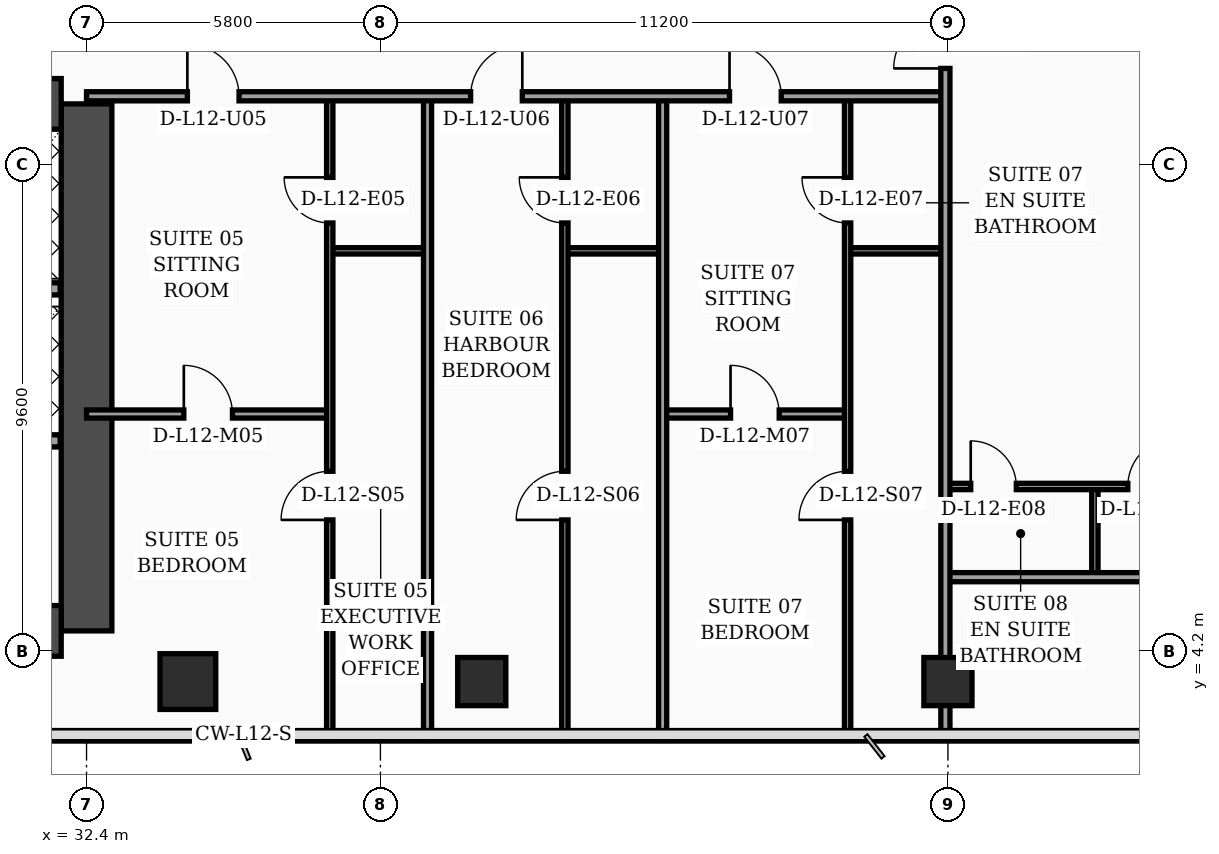
"""IFC4 building model, lengths in metres.
Left out: names, types, materials, properties, quantities, classifications, styles, units other than length and angle.
Written with IfcOpenShell. Run it as: python <this file> out.ifc"""

import sys

from ifc_helpers import new_model, si_unit, direction, frame, frame_2d, origin, origin_2d, place, context, subcontext, project, spatial, rectangle, hollow_rectangle, extrude, element, fill, save


model = new_model("IFC4")
c1 = context("Model", 3, precision=1e-05, world=origin(), true_north=direction((0.0, 1.0)))
c2 = subcontext(c1, "Body", "Model", "MODEL_VIEW")
j1 = project(units=[si_unit("LENGTHUNIT", "METRE"), si_unit("PLANEANGLEUNIT", "RADIAN")], contexts=[c1])
p1 = place(None, origin())
s1 = spatial("IfcSite", under=j1, at=p1, CompositionType="ELEMENT")
p2 = place(p1, origin())
s2 = spatial("IfcBuilding", under=s1, at=p2, CompositionType="ELEMENT")
p3 = place(p2, frame((0.0, 0.0, 54.6)))
s3 = spatial("IfcBuildingStorey", under=s2, at=p3, CompositionType="ELEMENT", Elevation=54.6)
p4 = place(p3, frame((32.4, 4.6, 0.0), z_axis=(0.0, 0.0, 1.0), x_axis=(0.0, 1.0, 0.0)))
e1 = element("IfcWall", 1, at=p4, inside=s3, PredefinedType="SHEAR", context=c2, shape_type="SweptSolid", body=[
    extrude(rectangle(XDim=10.4, YDim=1.0, at=frame_2d((5.2, 0.0))), origin(), (0.0, 0.0, 1.0), 3.56),
])
p5 = place(p3, frame((22.1, 15.0, 0.0), z_axis=(0.0, 0.0, 1.0), x_axis=(1.0, 0.0, 0.0)))
e2 = element("IfcWall", 2, at=p5, inside=s3, PredefinedType="SHEAR", context=c2, shape_type="SweptSolid", body=[
    extrude(rectangle(XDim=9.8, YDim=1.0, at=frame_2d((4.9, 0.0))), origin(), (0.0, 0.0, 1.0), 3.56),
])
p6 = place(p5, frame((4.8, 0.0, 0.0)))
e3 = element("IfcOpeningElement", 3, at=p6, cuts=e2, PredefinedType="OPENING", context=c2, shape_type="SweptSolid", body=[
    extrude(rectangle(XDim=1.1, YDim=2.2, at=frame_2d((0.55, 1.1))), frame((0.0, 0.51, 0.0), z_axis=(0.0, -1.0, 0.0), x_axis=(1.0, 0.0, 0.0)), (0.0, 0.0, 1.0), 1.02),
])
p7 = place(p3, frame((22.1, 4.6, 0.0), z_axis=(0.0, 0.0, 1.0), x_axis=(1.0, 0.0, 0.0)))
e4 = element("IfcWall", 4, at=p7, inside=s3, PredefinedType="SHEAR", context=c2, shape_type="SweptSolid", body=[
    extrude(rectangle(XDim=9.8, YDim=1.0, at=frame_2d((4.9, 0.0))), origin(), (0.0, 0.0, 1.0), 3.56),
])
p8 = place(p3, frame((34.4, 3.6, 0.0), z_axis=(0.0, 0.0, 1.0), x_axis=(1.0, 0.0, 0.0)))
e5 = element("IfcColumn", 5, at=p8, inside=s3, PredefinedType="COLUMN", context=c2, shape_type="SweptSolid", body=[
    extrude(hollow_rectangle(XDim=1.1, YDim=1.1, WallThickness=0.045, at=origin_2d()), origin(), (0.0, 0.0, 1.0), 3.56),
])
for number, where, z_axis, x_axis in (
    (6, (40.2, 3.6, 0.0), (0.0, 0.0, 1.0), (1.0, 0.0, 0.0)),
    (7, (49.4, 3.6, 0.0), (0.0, 0.0, 1.0), (1.0, 0.0, 0.0)),
):
    element("IfcColumn", number, at=place(p3, frame(where, z_axis=z_axis, x_axis=x_axis)), inside=s3, PredefinedType="COLUMN", context=c2, shape_type="SweptSolid", body=[
        extrude(hollow_rectangle(XDim=0.95, YDim=0.95, WallThickness=0.04, at=origin_2d()), origin(), (0.0, 0.0, 1.0), 3.56),
    ])
p9 = place(p3, frame((27.02, 11.35, 0.0), z_axis=(0.0, 0.0, 1.0), x_axis=(1.0, 0.0, 0.0)))
e8 = element("IfcWall", 8, at=p9, inside=s3, PredefinedType="SOLIDWALL", context=c2, shape_type="SweptSolid", body=[
    extrude(rectangle(XDim=4.86, YDim=0.24, at=frame_2d((2.43, 0.0))), origin(), (0.0, 0.0, 1.0), 3.56),
])
p10 = place(p9, frame((0.45, 0.0, 0.0)))
e9 = element("IfcOpeningElement", 9, at=p10, cuts=e8, PredefinedType="OPENING", context=c2, shape_type="SweptSolid", body=[
    extrude(rectangle(XDim=1.3, YDim=2.35, at=frame_2d((0.65, 1.175))), frame((0.0, 0.13, 0.0), z_axis=(0.0, -1.0, 0.0), x_axis=(1.0, 0.0, 0.0)), (0.0, 0.0, 1.0), 0.26),
])
p11 = place(p3, frame((27.02, 8.35, 0.0), z_axis=(0.0, 0.0, 1.0), x_axis=(1.0, 0.0, 0.0)))
e10 = element("IfcWall", 10, at=p11, inside=s3, PredefinedType="SOLIDWALL", context=c2, shape_type="SweptSolid", body=[
    extrude(rectangle(XDim=4.86, YDim=0.24, at=frame_2d((2.43, 0.0))), origin(), (0.0, 0.0, 1.0), 3.56),
])
p12 = place(p3, frame((37.2, 12.1, 0.0), z_axis=(0.0, 0.0, 1.0), x_axis=(1.0, 0.0, 0.0)))
e11 = element("IfcWall", 11, at=p12, inside=s3, PredefinedType="PARTITIONING", context=c2, shape_type="SweptSolid", body=[
    extrude(rectangle(XDim=1.93, YDim=0.125, at=frame_2d((0.965, 0.0))), origin(), (0.0, 0.0, 1.0), 3.56),
])
p13 = place(p3, frame((32.4, 8.88, 0.0), z_axis=(0.0, 0.0, 1.0), x_axis=(1.0, 0.0, 0.0)))
e12 = element("IfcWall", 12, at=p13, inside=s3, PredefinedType="PARTITIONING", context=c2, shape_type="SweptSolid", body=[
    extrude(rectangle(XDim=4.8, YDim=0.16, at=frame_2d((2.4, 0.0))), origin(), (0.0, 0.0, 1.0), 2.84),
])
p14 = place(p13, frame((1.92, 0.0, 0.0)))
e13 = element("IfcOpeningElement", 13, at=p14, cuts=e12, PredefinedType="OPENING", context=c2, shape_type="SweptSolid", body=[
    extrude(rectangle(XDim=0.96, YDim=2.2, at=frame_2d((0.48, 1.1))), frame((0.0, 0.09, 0.0), z_axis=(0.0, -1.0, 0.0), x_axis=(1.0, 0.0, 0.0)), (0.0, 0.0, 1.0), 0.18),
])
p15 = place(p3, frame((37.2, 2.44, 0.0), z_axis=(0.0, 0.0, 1.0), x_axis=(0.0, 1.0, 0.0)))
e14 = element("IfcWall", 14, at=p15, inside=s3, PredefinedType="PARTITIONING", context=c2, shape_type="SweptSolid", body=[
    extrude(rectangle(XDim=12.71, YDim=0.125, at=frame_2d((6.355, 0.0))), origin(), (0.0, 0.0, 1.0), 2.84),
])
p16 = place(p15, frame((4.35, 0.0, 0.0)))
e15 = element("IfcOpeningElement", 15, at=p16, cuts=e14, PredefinedType="OPENING", context=c2, shape_type="SweptSolid", body=[
    extrude(rectangle(XDim=0.96, YDim=2.2, at=frame_2d((0.48, 1.1))), frame((0.0, 0.073, 0.0), z_axis=(0.0, -1.0, 0.0), x_axis=(1.0, 0.0, 0.0)), (0.0, 0.0, 1.0), 0.145),
])
p17 = place(p15, frame((10.21, 0.0, 0.0)))
e16 = element("IfcOpeningElement", 16, at=p17, cuts=e14, PredefinedType="OPENING", context=c2, shape_type="SweptSolid", body=[
    extrude(rectangle(XDim=0.9, YDim=2.15, at=frame_2d((0.45, 1.075))), frame((0.0, 0.073, 0.0), z_axis=(0.0, -1.0, 0.0), x_axis=(1.0, 0.0, 0.0)), (0.0, 0.0, 1.0), 0.145),
])
p18 = place(p3, frame((41.84, 12.1, 0.0), z_axis=(0.0, 0.0, 1.0), x_axis=(1.0, 0.0, 0.0)))
e17 = element("IfcWall", 17, at=p18, inside=s3, PredefinedType="PARTITIONING", context=c2, shape_type="SweptSolid", body=[
    extrude(rectangle(XDim=1.93, YDim=0.125, at=frame_2d((0.965, 0.0))), origin(), (0.0, 0.0, 1.0), 3.56),
])
p19 = place(p3, frame((41.84, 2.44, 0.0), z_axis=(0.0, 0.0, 1.0), x_axis=(0.0, 1.0, 0.0)))
e18 = element("IfcWall", 18, at=p19, inside=s3, PredefinedType="PARTITIONING", context=c2, shape_type="SweptSolid", body=[
    extrude(rectangle(XDim=12.71, YDim=0.125, at=frame_2d((6.355, 0.0))), origin(), (0.0, 0.0, 1.0), 3.04),
])
p20 = place(p19, frame((4.35, 0.0, 0.0)))
e19 = element("IfcOpeningElement", 19, at=p20, cuts=e18, PredefinedType="OPENING", context=c2, shape_type="SweptSolid", body=[
    extrude(rectangle(XDim=0.96, YDim=2.2, at=frame_2d((0.48, 1.1))), frame((0.0, 0.073, 0.0), z_axis=(0.0, -1.0, 0.0), x_axis=(1.0, 0.0, 0.0)), (0.0, 0.0, 1.0), 0.145),
])
p21 = place(p19, frame((10.21, 0.0, 0.0)))
e20 = element("IfcOpeningElement", 20, at=p21, cuts=e18, PredefinedType="OPENING", context=c2, shape_type="SweptSolid", body=[
    extrude(rectangle(XDim=0.9, YDim=2.15, at=frame_2d((0.45, 1.075))), frame((0.0, 0.073, 0.0), z_axis=(0.0, -1.0, 0.0), x_axis=(1.0, 0.0, 0.0)), (0.0, 0.0, 1.0), 0.145),
])
p22 = place(p3, frame((39.13, 2.44, 0.0), z_axis=(0.0, 0.0, 1.0), x_axis=(0.0, 1.0, 0.0)))
e21 = element("IfcWall", 21, at=p22, inside=s3, PredefinedType="PARTITIONING", context=c2, shape_type="SweptSolid", body=[
    extrude(rectangle(XDim=12.71, YDim=0.16, at=frame_2d((6.355, 0.0))), origin(), (0.0, 0.0, 1.0), 2.84),
])
p23 = place(p3, frame((47.42, 12.1, 0.0), z_axis=(0.0, 0.0, 1.0), x_axis=(1.0, 0.0, 0.0)))
e22 = element("IfcWall", 22, at=p23, inside=s3, PredefinedType="PARTITIONING", context=c2, shape_type="SweptSolid", body=[
    extrude(rectangle(XDim=1.93, YDim=0.125, at=frame_2d((0.965, 0.0))), origin(), (0.0, 0.0, 1.0), 2.84),
])
p24 = place(p3, frame((43.77, 8.88, 0.0), z_axis=(0.0, 0.0, 1.0), x_axis=(1.0, 0.0, 0.0)))
e23 = element("IfcWall", 23, at=p24, inside=s3, PredefinedType="PARTITIONING", context=c2, shape_type="SweptSolid", body=[
    extrude(rectangle(XDim=3.65, YDim=0.16, at=frame_2d((1.825, 0.0))), origin(), (0.0, 0.0, 1.0), 3.56),
])
p25 = place(p24, frame((1.34, 0.0, 0.0)))
e24 = element("IfcOpeningElement", 24, at=p25, cuts=e23, PredefinedType="OPENING", context=c2, shape_type="SweptSolid", body=[
    extrude(rectangle(XDim=0.96, YDim=2.2, at=frame_2d((0.48, 1.1))), frame((0.0, 0.09, 0.0), z_axis=(0.0, -1.0, 0.0), x_axis=(1.0, 0.0, 0.0)), (0.0, 0.0, 1.0), 0.18),
])
p26 = place(p3, frame((47.42, 2.44, 0.0), z_axis=(0.0, 0.0, 1.0), x_axis=(0.0, 1.0, 0.0)))
e25 = element("IfcWall", 25, at=p26, inside=s3, PredefinedType="PARTITIONING", context=c2, shape_type="SweptSolid", body=[
    extrude(rectangle(XDim=12.71, YDim=0.125, at=frame_2d((6.355, 0.0))), origin(), (0.0, 0.0, 1.0), 2.84),
])
p27 = place(p26, frame((4.35, 0.0, 0.0)))
e26 = element("IfcOpeningElement", 26, at=p27, cuts=e25, PredefinedType="OPENING", context=c2, shape_type="SweptSolid", body=[
    extrude(rectangle(XDim=0.96, YDim=2.2, at=frame_2d((0.48, 1.1))), frame((0.0, 0.073, 0.0), z_axis=(0.0, -1.0, 0.0), x_axis=(1.0, 0.0, 0.0)), (0.0, 0.0, 1.0), 0.145),
])
p28 = place(p26, frame((10.21, 0.0, 0.0)))
e27 = element("IfcOpeningElement", 27, at=p28, cuts=e25, PredefinedType="OPENING", context=c2, shape_type="SweptSolid", body=[
    extrude(rectangle(XDim=0.9, YDim=2.15, at=frame_2d((0.45, 1.075))), frame((0.0, 0.073, 0.0), z_axis=(0.0, -1.0, 0.0), x_axis=(1.0, 0.0, 0.0)), (0.0, 0.0, 1.0), 0.145),
])
p29 = place(p3, frame((43.77, 2.44, 0.0), z_axis=(0.0, 0.0, 1.0), x_axis=(0.0, 1.0, 0.0)))
e28 = element("IfcWall", 28, at=p29, inside=s3, PredefinedType="PARTITIONING", context=c2, shape_type="SweptSolid", body=[
    extrude(rectangle(XDim=12.71, YDim=0.16, at=frame_2d((6.355, 0.0))), origin(), (0.0, 0.0, 1.0), 3.04),
])
p30 = place(p3, frame((32.4, 15.15, 0.0), z_axis=(0.0, 0.0, 1.0), x_axis=(1.0, 0.0, 0.0)))
e29 = element("IfcWall", 29, at=p30, inside=s3, PredefinedType="PARTITIONING", context=c2, shape_type="SweptSolid", body=[
    extrude(rectangle(XDim=16.95, YDim=0.18, at=frame_2d((8.475, 0.0))), origin(), (0.0, 0.0, 1.0), 2.84),
])
p31 = place(p30, frame((1.99, 0.0, 0.0)))
e30 = element("IfcOpeningElement", 30, at=p31, cuts=e29, PredefinedType="OPENING", context=c2, shape_type="SweptSolid", body=[
    extrude(rectangle(XDim=1.02, YDim=2.2, at=frame_2d((0.51, 1.1))), frame((0.0, 0.1, 0.0), z_axis=(0.0, -1.0, 0.0), x_axis=(1.0, 0.0, 0.0)), (0.0, 0.0, 1.0), 0.2),
])
p32 = place(p30, frame((7.58, 0.0, 0.0)))
e31 = element("IfcOpeningElement", 31, at=p32, cuts=e29, PredefinedType="OPENING", context=c2, shape_type="SweptSolid", body=[
    extrude(rectangle(XDim=1.02, YDim=2.2, at=frame_2d((0.51, 1.1))), frame((0.0, 0.1, 0.0), z_axis=(0.0, -1.0, 0.0), x_axis=(1.0, 0.0, 0.0)), (0.0, 0.0, 1.0), 0.2),
])
p33 = place(p30, frame((12.69, 0.0, 0.0)))
e32 = element("IfcOpeningElement", 32, at=p33, cuts=e29, PredefinedType="OPENING", context=c2, shape_type="SweptSolid", body=[
    extrude(rectangle(XDim=1.02, YDim=2.2, at=frame_2d((0.51, 1.1))), frame((0.0, 0.1, 0.0), z_axis=(0.0, -1.0, 0.0), x_axis=(1.0, 0.0, 0.0)), (0.0, 0.0, 1.0), 0.2),
])
p34 = place(p3, frame((52.3, 5.66, 0.0), z_axis=(0.0, 0.0, 1.0), x_axis=(0.0, 1.0, 0.0)))
e33 = element("IfcWall", 33, at=p34, inside=s3, PredefinedType="PARTITIONING", context=c2, shape_type="SweptSolid", body=[
    extrude(rectangle(XDim=1.79, YDim=0.125, at=frame_2d((0.895, 0.0))), origin(), (0.0, 0.0, 1.0), 3.56),
])
p35 = place(p3, frame((49.35, 7.45, 0.0), z_axis=(0.0, 0.0, 1.0), x_axis=(1.0, 0.0, 0.0)))
e34 = element("IfcWall", 34, at=p35, inside=s3, PredefinedType="PARTITIONING", context=c2, shape_type="SweptSolid", body=[
    extrude(rectangle(XDim=13.61, YDim=0.125, at=frame_2d((6.805, 0.0))), origin(), (0.0, 0.0, 1.0), 3.04),
])
p36 = place(p35, frame((0.5, 0.0, 0.0)))
e35 = element("IfcOpeningElement", 35, at=p36, cuts=e34, PredefinedType="OPENING", context=c2, shape_type="SweptSolid", body=[
    extrude(rectangle(XDim=0.9, YDim=2.15, at=frame_2d((0.45, 1.075))), frame((0.0, 0.073, 0.0), z_axis=(0.0, -1.0, 0.0), x_axis=(1.0, 0.0, 0.0)), (0.0, 0.0, 1.0), 0.145),
])
p37 = place(p35, frame((3.6, 0.0, 0.0)))
e36 = element("IfcOpeningElement", 36, at=p37, cuts=e34, PredefinedType="OPENING", context=c2, shape_type="SweptSolid", body=[
    extrude(rectangle(XDim=0.96, YDim=2.2, at=frame_2d((0.48, 1.1))), frame((0.0, 0.073, 0.0), z_axis=(0.0, -1.0, 0.0), x_axis=(1.0, 0.0, 0.0)), (0.0, 0.0, 1.0), 0.145),
])
p38 = place(p3, frame((49.35, 5.66, 0.0), z_axis=(0.0, 0.0, 1.0), x_axis=(1.0, 0.0, 0.0)))
e37 = element("IfcWall", 37, at=p38, inside=s3, PredefinedType="PARTITIONING", context=c2, shape_type="SweptSolid", body=[
    extrude(rectangle(XDim=11.05, YDim=0.18, at=frame_2d((5.525, 0.0))), origin(), (0.0, 0.0, 1.0), 2.84),
])
p39 = place(p3, frame((49.35, 2.44, 0.0), z_axis=(0.0, 0.0, 1.0), x_axis=(0.0, 1.0, 0.0)))
e38 = element("IfcWall", 38, at=p39, inside=s3, PredefinedType="PARTITIONING", context=c2, shape_type="SweptSolid", body=[
    extrude(rectangle(XDim=27.84, YDim=0.18, at=frame_2d((13.92, 0.0))), origin(), (0.0, 0.0, 1.0), 2.84),
])
p40 = place(p39, frame((13.26, 0.0, 0.0)))
e39 = element("IfcOpeningElement", 39, at=p40, cuts=e38, PredefinedType="OPENING", context=c2, shape_type="SweptSolid", body=[
    extrude(rectangle(XDim=1.02, YDim=2.2, at=frame_2d((0.51, 1.1))), frame((0.0, 0.1, 0.0), z_axis=(0.0, -1.0, 0.0), x_axis=(1.0, 0.0, 0.0)), (0.0, 0.0, 1.0), 0.2),
])
p41 = place(p39, frame((21.52, 0.0, 0.0)))
e40 = element("IfcOpeningElement", 40, at=p41, cuts=e38, PredefinedType="OPENING", context=c2, shape_type="SweptSolid", body=[
    extrude(rectangle(XDim=1.02, YDim=2.2, at=frame_2d((0.51, 1.1))), frame((0.0, 0.1, 0.0), z_axis=(0.0, -1.0, 0.0), x_axis=(1.0, 0.0, 0.0)), (0.0, 0.0, 1.0), 0.2),
])
p42 = place(p14, origin())
e41 = element("IfcDoor", 41, at=p42, inside=s3, OperationType="SINGLE_SWING_LEFT", PredefinedType="DOOR", context=c2, shape_type="SweptSolid", body=[
    extrude(rectangle(XDim=0.96, YDim=2.2, at=frame_2d((0.48, 1.1))), frame((0.0, 0.025, 0.0), z_axis=(0.0, -1.0, 0.0), x_axis=(1.0, 0.0, 0.0)), (0.0, 0.0, 1.0), 0.05),
])
fill(e13, e41)
p43 = place(p16, origin())
e42 = element("IfcDoor", 42, at=p43, inside=s3, OperationType="SINGLE_SWING_LEFT", PredefinedType="DOOR", context=c2, shape_type="SweptSolid", body=[
    extrude(rectangle(XDim=0.96, YDim=2.2, at=frame_2d((0.48, 1.1))), frame((0.0, 0.025, 0.0), z_axis=(0.0, -1.0, 0.0), x_axis=(1.0, 0.0, 0.0)), (0.0, 0.0, 1.0), 0.05),
])
fill(e15, e42)
p44 = place(p17, origin())
e43 = element("IfcDoor", 43, at=p44, inside=s3, OperationType="SINGLE_SWING_RIGHT", PredefinedType="DOOR", context=c2, shape_type="SweptSolid", body=[
    extrude(rectangle(XDim=0.9, YDim=2.15, at=frame_2d((0.45, 1.075))), frame((0.0, 0.025, 0.0), z_axis=(0.0, -1.0, 0.0), x_axis=(1.0, 0.0, 0.0)), (0.0, 0.0, 1.0), 0.05),
])
fill(e16, e43)
p45 = place(p20, origin())
e44 = element("IfcDoor", 44, at=p45, inside=s3, OperationType="SINGLE_SWING_LEFT", PredefinedType="DOOR", context=c2, shape_type="SweptSolid", body=[
    extrude(rectangle(XDim=0.96, YDim=2.2, at=frame_2d((0.48, 1.1))), frame((0.0, 0.025, 0.0), z_axis=(0.0, -1.0, 0.0), x_axis=(1.0, 0.0, 0.0)), (0.0, 0.0, 1.0), 0.05),
])
fill(e19, e44)
p46 = place(p21, origin())
e45 = element("IfcDoor", 45, at=p46, inside=s3, OperationType="SINGLE_SWING_RIGHT", PredefinedType="DOOR", context=c2, shape_type="SweptSolid", body=[
    extrude(rectangle(XDim=0.9, YDim=2.15, at=frame_2d((0.45, 1.075))), frame((0.0, 0.025, 0.0), z_axis=(0.0, -1.0, 0.0), x_axis=(1.0, 0.0, 0.0)), (0.0, 0.0, 1.0), 0.05),
])
fill(e20, e45)
p47 = place(p25, origin())
e46 = element("IfcDoor", 46, at=p47, inside=s3, OperationType="SINGLE_SWING_LEFT", PredefinedType="DOOR", context=c2, shape_type="SweptSolid", body=[
    extrude(rectangle(XDim=0.96, YDim=2.2, at=frame_2d((0.48, 1.1))), frame((0.0, 0.025, 0.0), z_axis=(0.0, -1.0, 0.0), x_axis=(1.0, 0.0, 0.0)), (0.0, 0.0, 1.0), 0.05),
])
fill(e24, e46)
p48 = place(p27, origin())
e47 = element("IfcDoor", 47, at=p48, inside=s3, OperationType="SINGLE_SWING_LEFT", PredefinedType="DOOR", context=c2, shape_type="SweptSolid", body=[
    extrude(rectangle(XDim=0.96, YDim=2.2, at=frame_2d((0.48, 1.1))), frame((0.0, 0.025, 0.0), z_axis=(0.0, -1.0, 0.0), x_axis=(1.0, 0.0, 0.0)), (0.0, 0.0, 1.0), 0.05),
])
fill(e26, e47)
p49 = place(p28, origin())
e48 = element("IfcDoor", 48, at=p49, inside=s3, OperationType="SINGLE_SWING_RIGHT", PredefinedType="DOOR", context=c2, shape_type="SweptSolid", body=[
    extrude(rectangle(XDim=0.9, YDim=2.15, at=frame_2d((0.45, 1.075))), frame((0.0, 0.025, 0.0), z_axis=(0.0, -1.0, 0.0), x_axis=(1.0, 0.0, 0.0)), (0.0, 0.0, 1.0), 0.05),
])
fill(e27, e48)
p50 = place(p31, origin())
e49 = element("IfcDoor", 49, at=p50, inside=s3, OperationType="SINGLE_SWING_LEFT", PredefinedType="DOOR", context=c2, shape_type="SweptSolid", body=[
    extrude(rectangle(XDim=1.02, YDim=2.2, at=frame_2d((0.51, 1.1))), frame((0.0, 0.025, 0.0), z_axis=(0.0, -1.0, 0.0), x_axis=(1.0, 0.0, 0.0)), (0.0, 0.0, 1.0), 0.05),
])
fill(e30, e49)
p51 = place(p32, origin())
e50 = element("IfcDoor", 50, at=p51, inside=s3, OperationType="SINGLE_SWING_RIGHT", PredefinedType="DOOR", context=c2, shape_type="SweptSolid", body=[
    extrude(rectangle(XDim=1.02, YDim=2.2, at=frame_2d((0.51, 1.1))), frame((0.0, 0.025, 0.0), z_axis=(0.0, -1.0, 0.0), x_axis=(1.0, 0.0, 0.0)), (0.0, 0.0, 1.0), 0.05),
])
fill(e31, e50)
p52 = place(p33, origin())
e51 = element("IfcDoor", 51, at=p52, inside=s3, OperationType="SINGLE_SWING_LEFT", PredefinedType="DOOR", context=c2, shape_type="SweptSolid", body=[
    extrude(rectangle(XDim=1.02, YDim=2.2, at=frame_2d((0.51, 1.1))), frame((0.0, 0.025, 0.0), z_axis=(0.0, -1.0, 0.0), x_axis=(1.0, 0.0, 0.0)), (0.0, 0.0, 1.0), 0.05),
])
fill(e32, e51)
p53 = place(p36, origin())
e52 = element("IfcDoor", 52, at=p53, inside=s3, OperationType="SINGLE_SWING_LEFT", PredefinedType="DOOR", context=c2, shape_type="SweptSolid", body=[
    extrude(rectangle(XDim=0.9, YDim=2.15, at=frame_2d((0.45, 1.075))), frame((0.0, 0.025, 0.0), z_axis=(0.0, -1.0, 0.0), x_axis=(1.0, 0.0, 0.0)), (0.0, 0.0, 1.0), 0.05),
])
fill(e35, e52)
p54 = place(p37, origin())
e53 = element("IfcDoor", 53, at=p54, inside=s3, OperationType="SINGLE_SWING_RIGHT", PredefinedType="DOOR", context=c2, shape_type="SweptSolid", body=[
    extrude(rectangle(XDim=0.96, YDim=2.2, at=frame_2d((0.48, 1.1))), frame((0.0, 0.025, 0.0), z_axis=(0.0, -1.0, 0.0), x_axis=(1.0, 0.0, 0.0)), (0.0, 0.0, 1.0), 0.05),
])
fill(e36, e53)
p55 = place(p40, origin())
e54 = element("IfcDoor", 54, at=p55, inside=s3, OperationType="SINGLE_SWING_LEFT", PredefinedType="DOOR", context=c2, shape_type="SweptSolid", body=[
    extrude(rectangle(XDim=1.02, YDim=2.2, at=frame_2d((0.51, 1.1))), frame((0.0, 0.025, 0.0), z_axis=(0.0, -1.0, 0.0), x_axis=(1.0, 0.0, 0.0)), (0.0, 0.0, 1.0), 0.05),
])
fill(e39, e54)
save(model, sys.argv[1])
